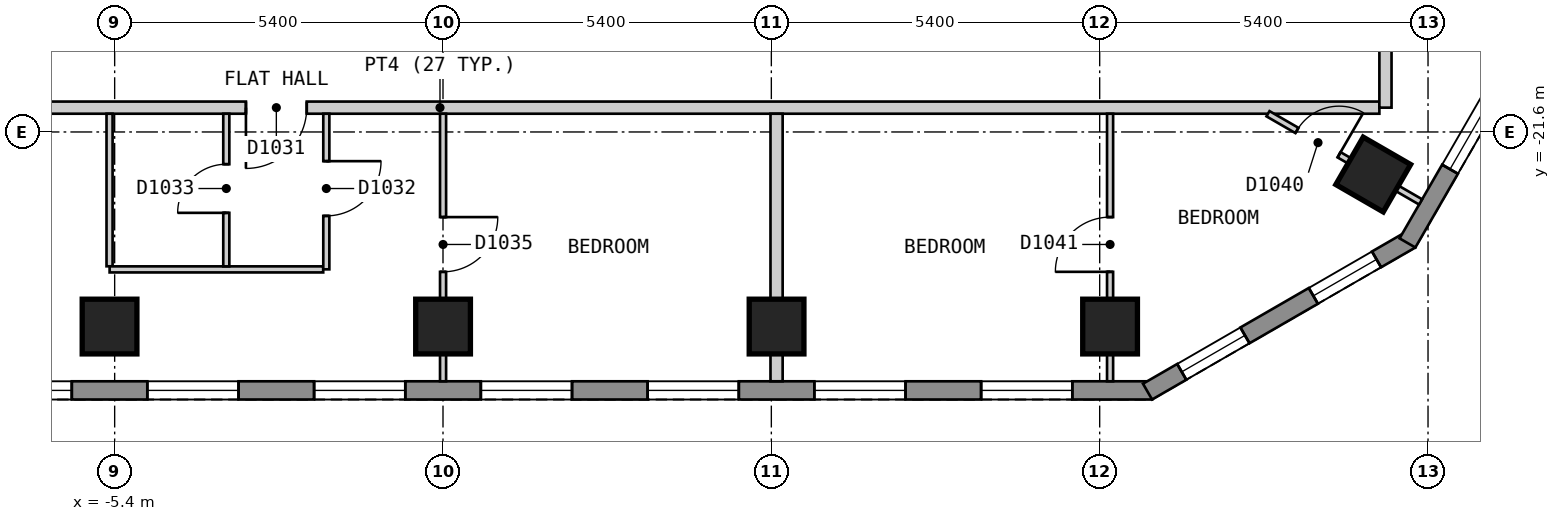
"""IFC4 building model, lengths in metres.
Left out: names, types, materials, properties, quantities, classifications, styles, units other than length and angle.
Written with IfcOpenShell. Run it as: python <this file> out.ifc"""

import sys

from ifc_helpers import new_model, si_unit, direction, frame, frame_2d, origin, origin_2d, place, context, subcontext, project, spatial, polyline, rectangle, outline, extrude, element, fill, save


model = new_model("IFC4")
c1 = context("Model", 3, precision=1e-05, world=origin(), true_north=direction((0.0, 1.0)))
c2 = subcontext(c1, "Body", "Model", "MODEL_VIEW")
j1 = project(units=[si_unit("LENGTHUNIT", "METRE"), si_unit("PLANEANGLEUNIT", "RADIAN")], contexts=[c1])
p1 = place(None, origin())
s1 = spatial("IfcSite", under=j1, at=p1, CompositionType="ELEMENT")
p2 = place(p1, origin())
s2 = spatial("IfcBuilding", under=s1, at=p2, CompositionType="ELEMENT")
p3 = place(p2, frame((0.0, 0.0, 126.6)))
s3 = spatial("IfcBuildingStorey", under=s2, at=p3, CompositionType="ELEMENT", Elevation=126.6)
for number, where, z_axis, x_axis in (
    (1, (-5.484, -24.8, 0.0), (0.0, 0.0, 1.0), (1.0, 0.0, 0.0)),
    (2, (0.001, -24.8, 0.0), (0.0, 0.0, 1.0), (1.0, 0.0, 0.0)),
    (3, (5.486, -24.8, 0.0), (0.0, 0.0, 1.0), (1.0, 0.0, 0.0)),
    (4, (10.971, -24.8, 0.0), (0.0, 0.0, 1.0), (1.0, 0.0, 0.0)),
    (5, (15.299, -22.3, 0.0), (0.0, 0.0, 1.0), (0.5, 0.866, 0.0)),
):
    element("IfcColumn", number, at=place(p3, frame(where, z_axis=z_axis, x_axis=x_axis)), inside=s3, PredefinedType="COLUMN", context=c2, shape_type="SweptSolid", body=[
        extrude(rectangle(XDim=0.9, YDim=0.9, at=origin_2d()), origin(), (0.0, 0.0, 1.0), 3.0),
    ])
p4 = place(p3, frame((-11.662, -25.85, 0.0), z_axis=(0.0, 0.0, 1.0), x_axis=(1.0, 0.0, 0.0)))
e6 = element("IfcWall", 6, at=p4, inside=s3, PredefinedType="SOLIDWALL", context=c2, shape_type="SweptSolid", body=[
    extrude(outline(polyline([(0.0, -0.15), (23.324, -0.15), (23.244, 0.15), (0.08, 0.15), (0.0, -0.15)])), origin(), (0.0, 0.0, 1.0), 2.7),
])
p5 = place(p4, frame((1.314, 0.0, 0.15)))
e7 = element("IfcOpeningElement", 7, at=p5, cuts=e6, PredefinedType="OPENING", context=c2, shape_type="SweptSolid", body=[
    extrude(rectangle(XDim=1.5, YDim=2.1, at=frame_2d((0.75, 1.05))), frame((0.0, 0.16, 0.0), z_axis=(0.0, -1.0, 0.0), x_axis=(1.0, 0.0, 0.0)), (0.0, 0.0, 1.0), 0.32),
])
p6 = place(p4, frame((4.057, 0.0, 0.15)))
e8 = element("IfcOpeningElement", 8, at=p6, cuts=e6, PredefinedType="OPENING", context=c2, shape_type="SweptSolid", body=[
    extrude(rectangle(XDim=1.5, YDim=2.1, at=frame_2d((0.75, 1.05))), frame((0.0, 0.16, 0.0), z_axis=(0.0, -1.0, 0.0), x_axis=(1.0, 0.0, 0.0)), (0.0, 0.0, 1.0), 0.32),
])
p7 = place(p4, frame((6.799, 0.0, 0.15)))
e9 = element("IfcOpeningElement", 9, at=p7, cuts=e6, PredefinedType="OPENING", context=c2, shape_type="SweptSolid", body=[
    extrude(rectangle(XDim=1.5, YDim=2.1, at=frame_2d((0.75, 1.05))), frame((0.0, 0.16, 0.0), z_axis=(0.0, -1.0, 0.0), x_axis=(1.0, 0.0, 0.0)), (0.0, 0.0, 1.0), 0.32),
])
p8 = place(p4, frame((9.542, 0.0, 0.15)))
e10 = element("IfcOpeningElement", 10, at=p8, cuts=e6, PredefinedType="OPENING", context=c2, shape_type="SweptSolid", body=[
    extrude(rectangle(XDim=1.5, YDim=2.1, at=frame_2d((0.75, 1.05))), frame((0.0, 0.16, 0.0), z_axis=(0.0, -1.0, 0.0), x_axis=(1.0, 0.0, 0.0)), (0.0, 0.0, 1.0), 0.32),
])
p9 = place(p4, frame((12.284, 0.0, 0.15)))
e11 = element("IfcOpeningElement", 11, at=p9, cuts=e6, PredefinedType="OPENING", context=c2, shape_type="SweptSolid", body=[
    extrude(rectangle(XDim=1.5, YDim=2.1, at=frame_2d((0.75, 1.05))), frame((0.0, 0.16, 0.0), z_axis=(0.0, -1.0, 0.0), x_axis=(1.0, 0.0, 0.0)), (0.0, 0.0, 1.0), 0.32),
])
p10 = place(p4, frame((15.027, 0.0, 0.15)))
e12 = element("IfcOpeningElement", 12, at=p10, cuts=e6, PredefinedType="OPENING", context=c2, shape_type="SweptSolid", body=[
    extrude(rectangle(XDim=1.5, YDim=2.1, at=frame_2d((0.75, 1.05))), frame((0.0, 0.16, 0.0), z_axis=(0.0, -1.0, 0.0), x_axis=(1.0, 0.0, 0.0)), (0.0, 0.0, 1.0), 0.32),
])
p11 = place(p4, frame((17.769, 0.0, 0.15)))
e13 = element("IfcOpeningElement", 13, at=p11, cuts=e6, PredefinedType="OPENING", context=c2, shape_type="SweptSolid", body=[
    extrude(rectangle(XDim=1.5, YDim=2.1, at=frame_2d((0.75, 1.05))), frame((0.0, 0.16, 0.0), z_axis=(0.0, -1.0, 0.0), x_axis=(1.0, 0.0, 0.0)), (0.0, 0.0, 1.0), 0.32),
])
p12 = place(p4, frame((20.512, 0.0, 0.15)))
e14 = element("IfcOpeningElement", 14, at=p12, cuts=e6, PredefinedType="OPENING", context=c2, shape_type="SweptSolid", body=[
    extrude(rectangle(XDim=1.5, YDim=2.1, at=frame_2d((0.75, 1.05))), frame((0.0, 0.16, 0.0), z_axis=(0.0, -1.0, 0.0), x_axis=(1.0, 0.0, 0.0)), (0.0, 0.0, 1.0), 0.32),
])
p13 = place(p3, frame((11.587, -25.87, 0.0), z_axis=(0.0, 0.0, 1.0), x_axis=(0.866022959057, 0.500004234368, 0.0)))
e15 = element("IfcWall", 15, at=p13, inside=s3, PredefinedType="SOLIDWALL", context=c2, shape_type="SweptSolid", body=[
    extrude(outline(polyline([(0.0, -0.15), (5.0, -0.15), (4.92, 0.15), (0.08, 0.15), (0.0, -0.15)])), origin(), (0.0, 0.0, 1.0), 2.7),
])
p14 = place(p13, frame((0.65, 0.0, 0.15)))
e16 = element("IfcOpeningElement", 16, at=p14, cuts=e15, PredefinedType="OPENING", context=c2, shape_type="SweptSolid", body=[
    extrude(rectangle(XDim=1.2, YDim=2.1, at=frame_2d((0.6, 1.05))), frame((0.0, 0.16, 0.0), z_axis=(0.0, -1.0, 0.0), x_axis=(1.0, 0.0, 0.0)), (0.0, 0.0, 1.0), 0.32),
])
p15 = place(p13, frame((3.149, 0.0, 0.15)))
e17 = element("IfcOpeningElement", 17, at=p15, cuts=e15, PredefinedType="OPENING", context=c2, shape_type="SweptSolid", body=[
    extrude(rectangle(XDim=1.2, YDim=2.1, at=frame_2d((0.6, 1.05))), frame((0.0, 0.16, 0.0), z_axis=(0.0, -1.0, 0.0), x_axis=(1.0, 0.0, 0.0)), (0.0, 0.0, 1.0), 0.32),
])
p16 = place(p3, frame((15.862, -23.425, 0.0), z_axis=(0.0, 0.0, 1.0), x_axis=(0.500017503135, 0.866015298109, 0.0)))
e18 = element("IfcWall", 18, at=p16, inside=s3, PredefinedType="SOLIDWALL", context=c2, shape_type="SweptSolid", body=[
    extrude(outline(polyline([(0.0, -0.15), (24.711, -0.15), (24.631, 0.15), (0.08, 0.15), (0.0, -0.15)])), origin(), (0.0, 0.0, 1.0), 2.7),
])
p17 = place(p16, frame((1.4, 0.0, 0.15)))
e19 = element("IfcOpeningElement", 19, at=p17, cuts=e18, PredefinedType="OPENING", context=c2, shape_type="SweptSolid", body=[
    extrude(rectangle(XDim=1.5, YDim=2.1, at=frame_2d((0.75, 1.05))), frame((0.0, 0.16, 0.0), z_axis=(0.0, -1.0, 0.0), x_axis=(1.0, 0.0, 0.0)), (0.0, 0.0, 1.0), 0.32),
])
p18 = place(p16, frame((4.316, 0.0, 0.15)))
e20 = element("IfcOpeningElement", 20, at=p18, cuts=e18, PredefinedType="OPENING", context=c2, shape_type="SweptSolid", body=[
    extrude(rectangle(XDim=1.5, YDim=2.1, at=frame_2d((0.75, 1.05))), frame((0.0, 0.16, 0.0), z_axis=(0.0, -1.0, 0.0), x_axis=(1.0, 0.0, 0.0)), (0.0, 0.0, 1.0), 0.32),
])
p19 = place(p16, frame((7.231, 0.0, 0.15)))
e21 = element("IfcOpeningElement", 21, at=p19, cuts=e18, PredefinedType="OPENING", context=c2, shape_type="SweptSolid", body=[
    extrude(rectangle(XDim=1.5, YDim=2.1, at=frame_2d((0.75, 1.05))), frame((0.0, 0.16, 0.0), z_axis=(0.0, -1.0, 0.0), x_axis=(1.0, 0.0, 0.0)), (0.0, 0.0, 1.0), 0.32),
])
p20 = place(p16, frame((10.147, 0.0, 0.15)))
e22 = element("IfcOpeningElement", 22, at=p20, cuts=e18, PredefinedType="OPENING", context=c2, shape_type="SweptSolid", body=[
    extrude(rectangle(XDim=1.5, YDim=2.1, at=frame_2d((0.75, 1.05))), frame((0.0, 0.16, 0.0), z_axis=(0.0, -1.0, 0.0), x_axis=(1.0, 0.0, 0.0)), (0.0, 0.0, 1.0), 0.32),
])
p21 = place(p16, frame((13.062, 0.0, 0.15)))
e23 = element("IfcOpeningElement", 23, at=p21, cuts=e18, PredefinedType="OPENING", context=c2, shape_type="SweptSolid", body=[
    extrude(rectangle(XDim=1.5, YDim=2.1, at=frame_2d((0.75, 1.05))), frame((0.0, 0.16, 0.0), z_axis=(0.0, -1.0, 0.0), x_axis=(1.0, 0.0, 0.0)), (0.0, 0.0, 1.0), 0.32),
])
p22 = place(p16, frame((15.977, 0.0, 0.15)))
e24 = element("IfcOpeningElement", 24, at=p22, cuts=e18, PredefinedType="OPENING", context=c2, shape_type="SweptSolid", body=[
    extrude(rectangle(XDim=1.5, YDim=2.1, at=frame_2d((0.75, 1.05))), frame((0.0, 0.16, 0.0), z_axis=(0.0, -1.0, 0.0), x_axis=(1.0, 0.0, 0.0)), (0.0, 0.0, 1.0), 0.32),
])
p23 = place(p16, frame((18.893, 0.0, 0.15)))
e25 = element("IfcOpeningElement", 25, at=p23, cuts=e18, PredefinedType="OPENING", context=c2, shape_type="SweptSolid", body=[
    extrude(rectangle(XDim=1.5, YDim=2.1, at=frame_2d((0.75, 1.05))), frame((0.0, 0.16, 0.0), z_axis=(0.0, -1.0, 0.0), x_axis=(1.0, 0.0, 0.0)), (0.0, 0.0, 1.0), 0.32),
])
p24 = place(p16, frame((21.809, 0.0, 0.15)))
e26 = element("IfcOpeningElement", 26, at=p24, cuts=e18, PredefinedType="OPENING", context=c2, shape_type="SweptSolid", body=[
    extrude(rectangle(XDim=1.5, YDim=2.1, at=frame_2d((0.75, 1.05))), frame((0.0, 0.16, 0.0), z_axis=(0.0, -1.0, 0.0), x_axis=(1.0, 0.0, 0.0)), (0.0, 0.0, 1.0), 0.32),
])
p25 = place(p3, frame((-15.499, -21.2, 0.0), z_axis=(0.0, 0.0, 1.0), x_axis=(1.0, 0.0, 0.0)))
e27 = element("IfcWall", 27, at=p25, inside=s3, PredefinedType="PARTITIONING", context=c2, shape_type="SweptSolid", body=[
    extrude(rectangle(XDim=30.899, YDim=0.2, at=frame_2d((15.449, 0.0))), origin(), (0.0, 0.0, 1.0), 2.7),
])
p26 = place(p25, frame((12.258, 0.0, 0.0)))
e28 = element("IfcOpeningElement", 28, at=p26, cuts=e27, PredefinedType="OPENING", context=c2, shape_type="SweptSolid", body=[
    extrude(rectangle(XDim=1.0, YDim=2.1, at=frame_2d((0.5, 1.05))), frame((0.0, 0.11, 0.0), z_axis=(0.0, -1.0, 0.0), x_axis=(1.0, 0.0, 0.0)), (0.0, 0.0, 1.0), 0.22),
])
p27 = place(p3, frame((15.5, -21.2, 0.0), z_axis=(0.0, 0.0, 1.0), x_axis=(0.0, 1.0, 0.0)))
e29 = element("IfcWall", 29, at=p27, inside=s3, PredefinedType="PARTITIONING", context=c2, shape_type="SweptSolid", body=[
    extrude(rectangle(XDim=17.648, YDim=0.2, at=frame_2d((8.824, 0.0))), origin(), (0.0, 0.0, 1.0), 2.7),
])
p28 = place(p27, frame((7.575, 0.0, 0.0)))
e30 = element("IfcOpeningElement", 30, at=p28, cuts=e29, PredefinedType="OPENING", context=c2, shape_type="SweptSolid", body=[
    extrude(rectangle(XDim=1.0, YDim=2.1, at=frame_2d((0.5, 1.05))), frame((0.0, 0.11, 0.0), z_axis=(0.0, -1.0, 0.0), x_axis=(1.0, 0.0, 0.0)), (0.0, 0.0, 1.0), 0.22),
])
p29 = place(p3, frame((-5.484, -21.3, 0.0), z_axis=(0.0, 0.0, 1.0), x_axis=(0.0, -1.0, 0.0)))
e31 = element("IfcWall", 31, at=p29, inside=s3, PredefinedType="PARTITIONING", context=c2, shape_type="SweptSolid", body=[
    extrude(rectangle(XDim=2.509, YDim=0.1, at=frame_2d((1.254, 0.0))), origin(), (0.0, 0.0, 1.0), 2.7),
])
p30 = place(p3, frame((0.001, -21.3, 0.0), z_axis=(0.0, 0.0, 1.0), x_axis=(0.0, -1.0, 0.0)))
e32 = element("IfcWall", 32, at=p30, inside=s3, PredefinedType="PARTITIONING", context=c2, shape_type="SweptSolid", body=[
    extrude(rectangle(XDim=4.4, YDim=0.1, at=frame_2d((2.2, 0.0))), origin(), (0.0, 0.0, 1.0), 2.7),
])
p31 = place(p30, frame((1.7, 0.0, 0.0)))
e33 = element("IfcOpeningElement", 33, at=p31, cuts=e32, PredefinedType="OPENING", context=c2, shape_type="SweptSolid", body=[
    extrude(rectangle(XDim=0.9, YDim=2.1, at=frame_2d((0.45, 1.05))), frame((0.0, 0.06, 0.0), z_axis=(0.0, -1.0, 0.0), x_axis=(1.0, 0.0, 0.0)), (0.0, 0.0, 1.0), 0.12),
])
p32 = place(p3, frame((13.568, -21.3, 0.0), z_axis=(0.0, 0.0, 1.0), x_axis=(0.865885342641, -0.500242514586, 0.0)))
e34 = element("IfcWall", 34, at=p32, inside=s3, PredefinedType="PARTITIONING", context=c2, shape_type="SweptSolid", body=[
    extrude(rectangle(XDim=2.898, YDim=0.1, at=frame_2d((1.449, 0.0))), origin(), (0.0, 0.0, 1.0), 2.7),
])
p33 = place(p32, frame((0.55, 0.0, 0.0)))
e35 = element("IfcOpeningElement", 35, at=p33, cuts=e34, PredefinedType="OPENING", context=c2, shape_type="SweptSolid", body=[
    extrude(rectangle(XDim=0.8, YDim=2.1, at=frame_2d((0.4, 1.05))), frame((0.0, 0.06, 0.0), z_axis=(0.0, -1.0, 0.0), x_axis=(1.0, 0.0, 0.0)), (0.0, 0.0, 1.0), 0.12),
])
p34 = place(p3, frame((-5.483, -23.86, 0.0), z_axis=(0.0, 0.0, 1.0), x_axis=(1.0, 0.0, 0.0)))
e36 = element("IfcWall", 36, at=p34, inside=s3, PredefinedType="PARTITIONING", context=c2, shape_type="SweptSolid", body=[
    extrude(rectangle(XDim=3.513, YDim=0.1, at=frame_2d((1.756, 0.0))), origin(), (0.0, 0.0, 1.0), 2.7),
])
p35 = place(p3, frame((10.971, -25.7, 0.0), z_axis=(0.0, 0.0, 1.0), x_axis=(0.0, 1.0, 0.0)))
e37 = element("IfcWall", 37, at=p35, inside=s3, PredefinedType="PARTITIONING", context=c2, shape_type="SweptSolid", body=[
    extrude(rectangle(XDim=4.4, YDim=0.1, at=frame_2d((2.2, 0.0))), origin(), (0.0, 0.0, 1.0), 2.7),
])
p36 = place(p35, frame((1.8, 0.0, 0.0)))
e38 = element("IfcOpeningElement", 38, at=p36, cuts=e37, PredefinedType="OPENING", context=c2, shape_type="SweptSolid", body=[
    extrude(rectangle(XDim=0.9, YDim=2.1, at=frame_2d((0.45, 1.05))), frame((0.0, 0.06, 0.0), z_axis=(0.0, -1.0, 0.0), x_axis=(1.0, 0.0, 0.0)), (0.0, 0.0, 1.0), 0.12),
])
p37 = place(p3, frame((-3.564, -23.81, 0.0), z_axis=(0.0, 0.0, 1.0), x_axis=(0.0, 1.0, 0.0)))
e39 = element("IfcWall", 39, at=p37, inside=s3, PredefinedType="PARTITIONING", context=c2, shape_type="SweptSolid", body=[
    extrude(rectangle(XDim=2.51, YDim=0.1, at=frame_2d((1.255, 0.0))), origin(), (0.0, 0.0, 1.0), 2.7),
])
p38 = place(p37, frame((0.88, 0.0, 0.0)))
e40 = element("IfcOpeningElement", 40, at=p38, cuts=e39, PredefinedType="OPENING", context=c2, shape_type="SweptSolid", body=[
    extrude(rectangle(XDim=0.8, YDim=2.1, at=frame_2d((0.4, 1.05))), frame((0.0, 0.06, 0.0), z_axis=(0.0, -1.0, 0.0), x_axis=(1.0, 0.0, 0.0)), (0.0, 0.0, 1.0), 0.12),
])
p39 = place(p3, frame((-1.919, -23.859, 0.0), z_axis=(0.0, 0.0, 1.0), x_axis=(0.0, 1.0, 0.0)))
e41 = element("IfcWall", 41, at=p39, inside=s3, PredefinedType="PARTITIONING", context=c2, shape_type="SweptSolid", body=[
    extrude(rectangle(XDim=2.559, YDim=0.1, at=frame_2d((1.279, 0.0))), origin(), (0.0, 0.0, 1.0), 2.7),
])
p40 = place(p39, frame((0.879, 0.0, 0.0)))
e42 = element("IfcOpeningElement", 42, at=p40, cuts=e41, PredefinedType="OPENING", context=c2, shape_type="SweptSolid", body=[
    extrude(rectangle(XDim=0.9, YDim=2.1, at=frame_2d((0.45, 1.05))), frame((0.0, 0.06, 0.0), z_axis=(0.0, -1.0, 0.0), x_axis=(1.0, 0.0, 0.0)), (0.0, 0.0, 1.0), 0.12),
])
p41 = place(p3, frame((5.486, -25.7, 0.0), z_axis=(0.0, 0.0, 1.0), x_axis=(0.0, 1.0, 0.0)))
e43 = element("IfcWall", 43, at=p41, inside=s3, PredefinedType="PARTITIONING", context=c2, shape_type="SweptSolid", body=[
    extrude(rectangle(XDim=4.4, YDim=0.2, at=frame_2d((2.2, 0.0))), origin(), (0.0, 0.0, 1.0), 2.7),
])
p42 = place(p6, origin())
e44 = element("IfcWindow", 44, at=p42, inside=s3, PartitioningType="SINGLE_PANEL", PredefinedType="WINDOW", context=c2, shape_type="SweptSolid", body=[
    extrude(rectangle(XDim=1.5, YDim=2.1, at=frame_2d((0.75, 1.05))), frame((0.0, 0.03, 0.0), z_axis=(0.0, -1.0, 0.0), x_axis=(1.0, 0.0, 0.0)), (0.0, 0.0, 1.0), 0.06),
])
fill(e8, e44)
p43 = place(p7, origin())
e45 = element("IfcWindow", 45, at=p43, inside=s3, PartitioningType="SINGLE_PANEL", PredefinedType="WINDOW", context=c2, shape_type="SweptSolid", body=[
    extrude(rectangle(XDim=1.5, YDim=2.1, at=frame_2d((0.75, 1.05))), frame((0.0, 0.03, 0.0), z_axis=(0.0, -1.0, 0.0), x_axis=(1.0, 0.0, 0.0)), (0.0, 0.0, 1.0), 0.06),
])
fill(e9, e45)
p44 = place(p8, origin())
e46 = element("IfcWindow", 46, at=p44, inside=s3, PartitioningType="SINGLE_PANEL", PredefinedType="WINDOW", context=c2, shape_type="SweptSolid", body=[
    extrude(rectangle(XDim=1.5, YDim=2.1, at=frame_2d((0.75, 1.05))), frame((0.0, 0.03, 0.0), z_axis=(0.0, -1.0, 0.0), x_axis=(1.0, 0.0, 0.0)), (0.0, 0.0, 1.0), 0.06),
])
fill(e10, e46)
p45 = place(p9, origin())
e47 = element("IfcWindow", 47, at=p45, inside=s3, PartitioningType="SINGLE_PANEL", PredefinedType="WINDOW", context=c2, shape_type="SweptSolid", body=[
    extrude(rectangle(XDim=1.5, YDim=2.1, at=frame_2d((0.75, 1.05))), frame((0.0, 0.03, 0.0), z_axis=(0.0, -1.0, 0.0), x_axis=(1.0, 0.0, 0.0)), (0.0, 0.0, 1.0), 0.06),
])
fill(e11, e47)
p46 = place(p10, origin())
e48 = element("IfcWindow", 48, at=p46, inside=s3, PartitioningType="SINGLE_PANEL", PredefinedType="WINDOW", context=c2, shape_type="SweptSolid", body=[
    extrude(rectangle(XDim=1.5, YDim=2.1, at=frame_2d((0.75, 1.05))), frame((0.0, 0.03, 0.0), z_axis=(0.0, -1.0, 0.0), x_axis=(1.0, 0.0, 0.0)), (0.0, 0.0, 1.0), 0.06),
])
fill(e12, e48)
p47 = place(p11, origin())
e49 = element("IfcWindow", 49, at=p47, inside=s3, PartitioningType="SINGLE_PANEL", PredefinedType="WINDOW", context=c2, shape_type="SweptSolid", body=[
    extrude(rectangle(XDim=1.5, YDim=2.1, at=frame_2d((0.75, 1.05))), frame((0.0, 0.03, 0.0), z_axis=(0.0, -1.0, 0.0), x_axis=(1.0, 0.0, 0.0)), (0.0, 0.0, 1.0), 0.06),
])
fill(e13, e49)
p48 = place(p12, origin())
e50 = element("IfcWindow", 50, at=p48, inside=s3, PartitioningType="SINGLE_PANEL", PredefinedType="WINDOW", context=c2, shape_type="SweptSolid", body=[
    extrude(rectangle(XDim=1.5, YDim=2.1, at=frame_2d((0.75, 1.05))), frame((0.0, 0.03, 0.0), z_axis=(0.0, -1.0, 0.0), x_axis=(1.0, 0.0, 0.0)), (0.0, 0.0, 1.0), 0.06),
])
fill(e14, e50)
p49 = place(p14, origin())
e51 = element("IfcWindow", 51, at=p49, inside=s3, PartitioningType="SINGLE_PANEL", PredefinedType="WINDOW", context=c2, shape_type="SweptSolid", body=[
    extrude(rectangle(XDim=1.2, YDim=2.1, at=frame_2d((0.6, 1.05))), frame((0.0, 0.03, 0.0), z_axis=(0.0, -1.0, 0.0), x_axis=(1.0, 0.0, 0.0)), (0.0, 0.0, 1.0), 0.06),
])
fill(e16, e51)
p50 = place(p15, origin())
e52 = element("IfcWindow", 52, at=p50, inside=s3, PartitioningType="SINGLE_PANEL", PredefinedType="WINDOW", context=c2, shape_type="SweptSolid", body=[
    extrude(rectangle(XDim=1.2, YDim=2.1, at=frame_2d((0.6, 1.05))), frame((0.0, 0.03, 0.0), z_axis=(0.0, -1.0, 0.0), x_axis=(1.0, 0.0, 0.0)), (0.0, 0.0, 1.0), 0.06),
])
fill(e17, e52)
p51 = place(p17, origin())
e53 = element("IfcWindow", 53, at=p51, inside=s3, PartitioningType="SINGLE_PANEL", PredefinedType="WINDOW", context=c2, shape_type="SweptSolid", body=[
    extrude(rectangle(XDim=1.5, YDim=2.1, at=frame_2d((0.75, 1.05))), frame((0.0, 0.03, 0.0), z_axis=(0.0, -1.0, 0.0), x_axis=(1.0, 0.0, 0.0)), (0.0, 0.0, 1.0), 0.06),
])
fill(e19, e53)
p52 = place(p26, origin())
e54 = element("IfcDoor", 54, at=p52, inside=s3, OperationType="SINGLE_SWING_LEFT", PredefinedType="DOOR", context=c2, shape_type="SweptSolid", body=[
    extrude(rectangle(XDim=1.0, YDim=2.1, at=frame_2d((0.5, 1.05))), frame((0.0, 0.025, 0.0), z_axis=(0.0, -1.0, 0.0), x_axis=(1.0, 0.0, 0.0)), (0.0, 0.0, 1.0), 0.05),
])
fill(e28, e54)
p53 = place(p40, origin())
e55 = element("IfcDoor", 55, at=p53, inside=s3, OperationType="SINGLE_SWING_RIGHT", PredefinedType="DOOR", context=c2, shape_type="SweptSolid", body=[
    extrude(rectangle(XDim=0.9, YDim=2.1, at=frame_2d((0.45, 1.05))), frame((0.0, 0.025, 0.0), z_axis=(0.0, -1.0, 0.0), x_axis=(1.0, 0.0, 0.0)), (0.0, 0.0, 1.0), 0.05),
])
fill(e42, e55)
p54 = place(p38, origin())
e56 = element("IfcDoor", 56, at=p54, inside=s3, OperationType="SINGLE_SWING_LEFT", PredefinedType="DOOR", context=c2, shape_type="SweptSolid", body=[
    extrude(rectangle(XDim=0.8, YDim=2.1, at=frame_2d((0.4, 1.05))), frame((0.0, 0.025, 0.0), z_axis=(0.0, -1.0, 0.0), x_axis=(1.0, 0.0, 0.0)), (0.0, 0.0, 1.0), 0.05),
])
fill(e40, e56)
p55 = place(p31, origin())
e57 = element("IfcDoor", 57, at=p55, inside=s3, OperationType="SINGLE_SWING_LEFT", PredefinedType="DOOR", context=c2, shape_type="SweptSolid", body=[
    extrude(rectangle(XDim=0.9, YDim=2.1, at=frame_2d((0.45, 1.05))), frame((0.0, 0.025, 0.0), z_axis=(0.0, -1.0, 0.0), x_axis=(1.0, 0.0, 0.0)), (0.0, 0.0, 1.0), 0.05),
])
fill(e33, e57)
p56 = place(p33, origin())
e58 = element("IfcDoor", 58, at=p56, inside=s3, OperationType="SINGLE_SWING_RIGHT", PredefinedType="DOOR", context=c2, shape_type="SweptSolid", body=[
    extrude(rectangle(XDim=0.8, YDim=2.1, at=frame_2d((0.4, 1.05))), frame((0.0, 0.025, 0.0), z_axis=(0.0, -1.0, 0.0), x_axis=(1.0, 0.0, 0.0)), (0.0, 0.0, 1.0), 0.05),
])
fill(e35, e58)
p57 = place(p36, origin())
e59 = element("IfcDoor", 59, at=p57, inside=s3, OperationType="SINGLE_SWING_LEFT", PredefinedType="DOOR", context=c2, shape_type="SweptSolid", body=[
    extrude(rectangle(XDim=0.9, YDim=2.1, at=frame_2d((0.45, 1.05))), frame((0.0, 0.025, 0.0), z_axis=(0.0, -1.0, 0.0), x_axis=(1.0, 0.0, 0.0)), (0.0, 0.0, 1.0), 0.05),
])
fill(e38, e59)
save(model, sys.argv[1])
